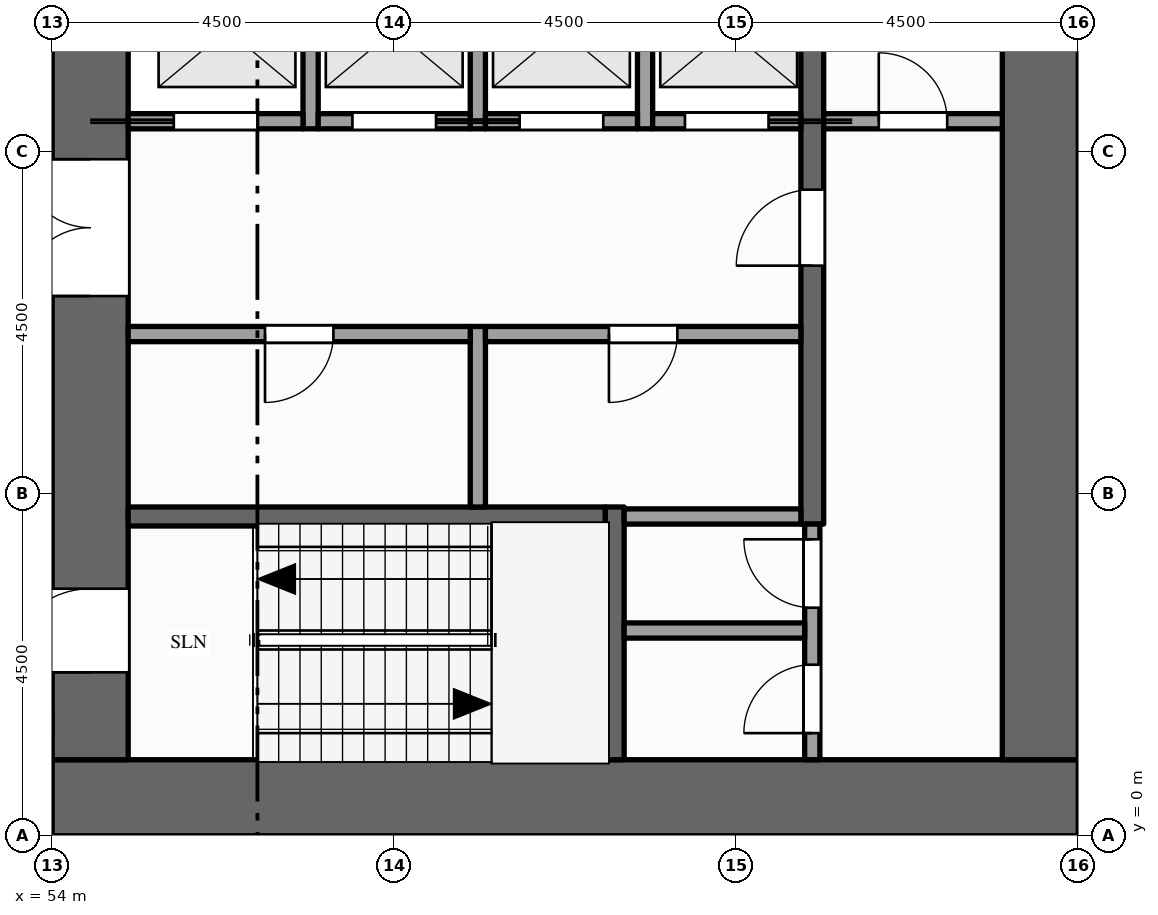
"""IFC4 building model, lengths in metres.
Left out: names, types, materials, properties, quantities, classifications, styles, units other than length and angle.
Written with IfcOpenShell. Run it as: python <this file> out.ifc"""

import sys

from ifc_helpers import new_model, si_unit, direction, frame, frame_2d, origin, place, context, subcontext, project, spatial, rectangle, extrude, element, fill, save


model = new_model("IFC4")
c1 = context("Model", 3, precision=1e-05, world=origin(), true_north=direction((0.0, 1.0)))
c2 = subcontext(c1, "Body", "Model", "MODEL_VIEW")
j1 = project(units=[si_unit("LENGTHUNIT", "METRE"), si_unit("PLANEANGLEUNIT", "RADIAN")], contexts=[c1])
p1 = place(None, origin())
s1 = spatial("IfcSite", under=j1, at=p1, CompositionType="ELEMENT")
p2 = place(p1, origin())
s2 = spatial("IfcBuilding", under=s1, at=p2, CompositionType="ELEMENT")
p3 = place(p2, frame((0.0, 0.0, 151.0)))
s3 = spatial("IfcBuildingStorey", under=s2, at=p3, CompositionType="ELEMENT", Elevation=151.0)
p4 = place(p3, frame((67.5, 0.5, -0.15), z_axis=(0.0, 0.0, 1.0), x_axis=(-1.0, 0.0, 0.0)))
e1 = element("IfcWall", 1, at=p4, inside=s3, PredefinedType="SHEAR", context=c2, shape_type="SweptSolid", body=[
    extrude(rectangle(XDim=13.5, YDim=1.0, at=frame_2d((6.75, 0.0))), origin(), (0.0, 0.0, 1.0), 4.0),
])
p5 = place(p3, frame((54.5, 1.0, -0.15), z_axis=(0.0, 0.0, 1.0), x_axis=(0.0, 1.0, 0.0)))
e2 = element("IfcWall", 2, at=p5, inside=s3, PredefinedType="SHEAR", context=c2, shape_type="SweptSolid", body=[
    extrude(rectangle(XDim=20.5, YDim=1.0, at=frame_2d((10.25, 0.0))), origin(), (0.0, 0.0, 1.0), 4.0),
])
p6 = place(p5, frame((6.1, 0.0, 0.15)))
e3 = element("IfcOpeningElement", 3, at=p6, cuts=e2, PredefinedType="OPENING", context=c2, shape_type="SweptSolid", body=[
    extrude(rectangle(XDim=1.8, YDim=2.1, at=frame_2d((0.9, 1.05))), frame((0.0, 0.51, 0.0), z_axis=(0.0, -1.0, 0.0), x_axis=(1.0, 0.0, 0.0)), (0.0, 0.0, 1.0), 1.02),
])
p7 = place(p5, frame((12.15, 0.0, 0.15)))
e4 = element("IfcOpeningElement", 4, at=p7, cuts=e2, PredefinedType="OPENING", context=c2, shape_type="SweptSolid", body=[
    extrude(rectangle(XDim=1.1, YDim=2.1, at=frame_2d((0.55, 1.05))), frame((0.0, 0.51, 0.0), z_axis=(0.0, -1.0, 0.0), x_axis=(1.0, 0.0, 0.0)), (0.0, 0.0, 1.0), 1.02),
])
p8 = place(p5, frame((1.15, 0.0, 0.15)))
e5 = element("IfcOpeningElement", 5, at=p8, cuts=e2, PredefinedType="OPENING", context=c2, shape_type="SweptSolid", body=[
    extrude(rectangle(XDim=1.1, YDim=2.1, at=frame_2d((0.55, 1.05))), frame((0.0, 0.51, 0.0), z_axis=(0.0, -1.0, 0.0), x_axis=(1.0, 0.0, 0.0)), (0.0, 0.0, 1.0), 1.02),
])
p9 = place(p5, frame((18.35, 0.0, 0.15)))
e6 = element("IfcOpeningElement", 6, at=p9, cuts=e2, PredefinedType="OPENING", context=c2, shape_type="SweptSolid", body=[
    extrude(rectangle(XDim=1.1, YDim=2.1, at=frame_2d((0.55, 1.05))), frame((0.0, 0.51, 0.0), z_axis=(0.0, -1.0, 0.0), x_axis=(1.0, 0.0, 0.0)), (0.0, 0.0, 1.0), 1.02),
])
p10 = place(p3, frame((67.0, 1.0, -0.15), z_axis=(0.0, 0.0, 1.0), x_axis=(0.0, 1.0, 0.0)))
e7 = element("IfcWall", 7, at=p10, inside=s3, PredefinedType="SHEAR", context=c2, shape_type="SweptSolid", body=[
    extrude(rectangle(XDim=20.5, YDim=1.0, at=frame_2d((10.25, 0.0))), origin(), (0.0, 0.0, 1.0), 4.0),
])
p11 = place(p3, frame((57.4, 9.3, 0.0), z_axis=(0.0, 0.0, 1.0), x_axis=(0.0, 1.0, 0.0)))
e8 = element("IfcWall", 8, at=p11, inside=s3, PredefinedType="SOLIDWALL", context=c2, shape_type="SweptSolid", body=[
    extrude(rectangle(XDim=2.6, YDim=0.2, at=frame_2d((1.3, 0.0))), origin(), (0.0, 0.0, 1.0), 3.85),
])
p12 = place(p3, frame((59.6, 4.325, 0.0), z_axis=(0.0, 0.0, 1.0), x_axis=(0.0, 1.0, 0.0)))
e9 = element("IfcWall", 9, at=p12, inside=s3, PredefinedType="PARTITIONING", context=c2, shape_type="SweptSolid", body=[
    extrude(rectangle(XDim=2.375, YDim=0.2, at=frame_2d((1.188, 0.0))), origin(), (0.0, 0.0, 1.0), 3.85),
])
p13 = place(p3, frame((59.6, 9.3, 0.0), z_axis=(0.0, 0.0, 1.0), x_axis=(0.0, 1.0, 0.0)))
e10 = element("IfcWall", 10, at=p13, inside=s3, PredefinedType="SOLIDWALL", context=c2, shape_type="SweptSolid", body=[
    extrude(rectangle(XDim=2.6, YDim=0.2, at=frame_2d((1.3, 0.0))), origin(), (0.0, 0.0, 1.0), 3.85),
])
p14 = place(p3, frame((61.4, 1.0, 0.0), z_axis=(0.0, 0.0, 1.0), x_axis=(0.0, 1.0, 0.0)))
e11 = element("IfcWall", 11, at=p14, inside=s3, PredefinedType="SHEAR", context=c2, shape_type="SweptSolid", body=[
    extrude(rectangle(XDim=3.325, YDim=0.25, at=frame_2d((1.663, 0.0))), origin(), (0.0, 0.0, 1.0), 3.85),
])
p15 = place(p3, frame((61.8, 9.3, 0.0), z_axis=(0.0, 0.0, 1.0), x_axis=(0.0, 1.0, 0.0)))
e12 = element("IfcWall", 12, at=p15, inside=s3, PredefinedType="SOLIDWALL", context=c2, shape_type="SweptSolid", body=[
    extrude(rectangle(XDim=2.6, YDim=0.2, at=frame_2d((1.3, 0.0))), origin(), (0.0, 0.0, 1.0), 3.85),
])
p16 = place(p3, frame((64.0, 1.0, 0.0), z_axis=(0.0, 0.0, 1.0), x_axis=(0.0, 1.0, 0.0)))
e13 = element("IfcWall", 13, at=p16, inside=s3, PredefinedType="PARTITIONING", context=c2, shape_type="SweptSolid", body=[
    extrude(rectangle(XDim=3.1, YDim=0.2, at=frame_2d((1.55, 0.0))), origin(), (0.0, 0.0, 1.0), 3.85),
])
p17 = place(p16, frame((0.35, 0.0, 0.0)))
e14 = element("IfcOpeningElement", 14, at=p17, cuts=e13, PredefinedType="OPENING", context=c2, shape_type="SweptSolid", body=[
    extrude(rectangle(XDim=0.9, YDim=2.1, at=frame_2d((0.45, 1.05))), frame((0.0, 0.11, 0.0), z_axis=(0.0, -1.0, 0.0), x_axis=(1.0, 0.0, 0.0)), (0.0, 0.0, 1.0), 0.22),
])
p18 = place(p16, frame((2.0, 0.0, 0.0)))
e15 = element("IfcOpeningElement", 15, at=p18, cuts=e13, PredefinedType="OPENING", context=c2, shape_type="SweptSolid", body=[
    extrude(rectangle(XDim=0.9, YDim=2.1, at=frame_2d((0.45, 1.05))), frame((0.0, 0.11, 0.0), z_axis=(0.0, -1.0, 0.0), x_axis=(1.0, 0.0, 0.0)), (0.0, 0.0, 1.0), 0.22),
])
p19 = place(p3, frame((64.0, 4.1, 0.0), z_axis=(0.0, 0.0, 1.0), x_axis=(0.0, 1.0, 0.0)))
e16 = element("IfcWall", 16, at=p19, inside=s3, PredefinedType="SHEAR", context=c2, shape_type="SweptSolid", body=[
    extrude(rectangle(XDim=14.5, YDim=0.3, at=frame_2d((7.25, 0.0))), origin(), (0.0, 0.0, 1.0), 3.85),
])
p20 = place(p19, frame((3.4, 0.0, 0.0)))
e17 = element("IfcOpeningElement", 17, at=p20, cuts=e16, PredefinedType="OPENING", context=c2, shape_type="SweptSolid", body=[
    extrude(rectangle(XDim=1.0, YDim=2.1, at=frame_2d((0.5, 1.05))), frame((0.0, 0.16, 0.0), z_axis=(0.0, -1.0, 0.0), x_axis=(1.0, 0.0, 0.0)), (0.0, 0.0, 1.0), 0.32),
])
p21 = place(p19, frame((9.1, 0.0, 0.0)))
e18 = element("IfcOpeningElement", 18, at=p21, cuts=e16, PredefinedType="OPENING", context=c2, shape_type="SweptSolid", body=[
    extrude(rectangle(XDim=1.0, YDim=2.1, at=frame_2d((0.5, 1.05))), frame((0.0, 0.16, 0.0), z_axis=(0.0, -1.0, 0.0), x_axis=(1.0, 0.0, 0.0)), (0.0, 0.0, 1.0), 0.32),
])
p22 = place(p3, frame((61.525, 2.7, 0.0), z_axis=(0.0, 0.0, 1.0), x_axis=(1.0, 0.0, 0.0)))
e19 = element("IfcWall", 19, at=p22, inside=s3, PredefinedType="PARTITIONING", context=c2, shape_type="SweptSolid", body=[
    extrude(rectangle(XDim=2.375, YDim=0.2, at=frame_2d((1.188, 0.0))), origin(), (0.0, 0.0, 1.0), 3.85),
])
p23 = place(p3, frame((55.0, 4.2, 0.0), z_axis=(0.0, 0.0, 1.0), x_axis=(1.0, 0.0, 0.0)))
e20 = element("IfcWall", 20, at=p23, inside=s3, PredefinedType="SHEAR", context=c2, shape_type="SweptSolid", body=[
    extrude(rectangle(XDim=6.275, YDim=0.25, at=frame_2d((3.137, 0.0))), origin(), (0.0, 0.0, 1.0), 3.85),
])
p24 = place(p3, frame((61.525, 4.2, 0.0), z_axis=(0.0, 0.0, 1.0), x_axis=(1.0, 0.0, 0.0)))
e21 = element("IfcWall", 21, at=p24, inside=s3, PredefinedType="PARTITIONING", context=c2, shape_type="SweptSolid", body=[
    extrude(rectangle(XDim=2.325, YDim=0.2, at=frame_2d((1.163, 0.0))), origin(), (0.0, 0.0, 1.0), 3.85),
])
p25 = place(p3, frame((55.0, 6.6, 0.0), z_axis=(0.0, 0.0, 1.0), x_axis=(1.0, 0.0, 0.0)))
e22 = element("IfcWall", 22, at=p25, inside=s3, PredefinedType="PARTITIONING", context=c2, shape_type="SweptSolid", body=[
    extrude(rectangle(XDim=4.5, YDim=0.2, at=frame_2d((2.25, 0.0))), origin(), (0.0, 0.0, 1.0), 3.85),
])
p26 = place(p25, frame((1.8, 0.0, 0.0)))
e23 = element("IfcOpeningElement", 23, at=p26, cuts=e22, PredefinedType="OPENING", context=c2, shape_type="SweptSolid", body=[
    extrude(rectangle(XDim=0.9, YDim=2.1, at=frame_2d((0.45, 1.05))), frame((0.0, 0.11, 0.0), z_axis=(0.0, -1.0, 0.0), x_axis=(1.0, 0.0, 0.0)), (0.0, 0.0, 1.0), 0.22),
])
p27 = place(p3, frame((59.7, 6.6, 0.0), z_axis=(0.0, 0.0, 1.0), x_axis=(1.0, 0.0, 0.0)))
e24 = element("IfcWall", 24, at=p27, inside=s3, PredefinedType="PARTITIONING", context=c2, shape_type="SweptSolid", body=[
    extrude(rectangle(XDim=4.15, YDim=0.2, at=frame_2d((2.075, 0.0))), origin(), (0.0, 0.0, 1.0), 3.85),
])
p28 = place(p27, frame((1.625, 0.0, 0.0)))
e25 = element("IfcOpeningElement", 25, at=p28, cuts=e24, PredefinedType="OPENING", context=c2, shape_type="SweptSolid", body=[
    extrude(rectangle(XDim=0.9, YDim=2.1, at=frame_2d((0.45, 1.05))), frame((0.0, 0.11, 0.0), z_axis=(0.0, -1.0, 0.0), x_axis=(1.0, 0.0, 0.0)), (0.0, 0.0, 1.0), 0.22),
])
p29 = place(p3, frame((55.0, 9.4, 0.0), z_axis=(0.0, 0.0, 1.0), x_axis=(1.0, 0.0, 0.0)))
e26 = element("IfcWall", 26, at=p29, inside=s3, PredefinedType="SOLIDWALL", context=c2, shape_type="SweptSolid", body=[
    extrude(rectangle(XDim=2.3, YDim=0.2, at=frame_2d((1.15, 0.0))), origin(), (0.0, 0.0, 1.0), 3.85),
])
p30 = place(p29, frame((0.6, 0.0, 0.012)))
e27 = element("IfcOpeningElement", 27, at=p30, cuts=e26, PredefinedType="OPENING", context=c2, shape_type="SweptSolid", body=[
    extrude(rectangle(XDim=1.1, YDim=2.1, at=frame_2d((0.55, 1.05))), frame((0.0, 0.11, 0.0), z_axis=(0.0, -1.0, 0.0), x_axis=(1.0, 0.0, 0.0)), (0.0, 0.0, 1.0), 0.22),
])
p31 = place(p3, frame((57.5, 9.4, 0.0), z_axis=(0.0, 0.0, 1.0), x_axis=(1.0, 0.0, 0.0)))
e28 = element("IfcWall", 28, at=p31, inside=s3, PredefinedType="SOLIDWALL", context=c2, shape_type="SweptSolid", body=[
    extrude(rectangle(XDim=2.0, YDim=0.2, at=frame_2d((1.0, 0.0))), origin(), (0.0, 0.0, 1.0), 3.85),
])
p32 = place(p31, frame((0.45, 0.0, 0.012)))
e29 = element("IfcOpeningElement", 29, at=p32, cuts=e28, PredefinedType="OPENING", context=c2, shape_type="SweptSolid", body=[
    extrude(rectangle(XDim=1.1, YDim=2.1, at=frame_2d((0.55, 1.05))), frame((0.0, 0.11, 0.0), z_axis=(0.0, -1.0, 0.0), x_axis=(1.0, 0.0, 0.0)), (0.0, 0.0, 1.0), 0.22),
])
p33 = place(p3, frame((59.7, 9.4, 0.0), z_axis=(0.0, 0.0, 1.0), x_axis=(1.0, 0.0, 0.0)))
e30 = element("IfcWall", 30, at=p33, inside=s3, PredefinedType="SOLIDWALL", context=c2, shape_type="SweptSolid", body=[
    extrude(rectangle(XDim=2.0, YDim=0.2, at=frame_2d((1.0, 0.0))), origin(), (0.0, 0.0, 1.0), 3.85),
])
p34 = place(p33, frame((0.45, 0.0, 0.012)))
e31 = element("IfcOpeningElement", 31, at=p34, cuts=e30, PredefinedType="OPENING", context=c2, shape_type="SweptSolid", body=[
    extrude(rectangle(XDim=1.1, YDim=2.1, at=frame_2d((0.55, 1.05))), frame((0.0, 0.11, 0.0), z_axis=(0.0, -1.0, 0.0), x_axis=(1.0, 0.0, 0.0)), (0.0, 0.0, 1.0), 0.22),
])
p35 = place(p3, frame((61.9, 9.4, 0.0), z_axis=(0.0, 0.0, 1.0), x_axis=(1.0, 0.0, 0.0)))
e32 = element("IfcWall", 32, at=p35, inside=s3, PredefinedType="SOLIDWALL", context=c2, shape_type="SweptSolid", body=[
    extrude(rectangle(XDim=1.95, YDim=0.2, at=frame_2d((0.975, 0.0))), origin(), (0.0, 0.0, 1.0), 3.85),
])
p36 = place(p35, frame((0.425, 0.0, 0.012)))
e33 = element("IfcOpeningElement", 33, at=p36, cuts=e32, PredefinedType="OPENING", context=c2, shape_type="SweptSolid", body=[
    extrude(rectangle(XDim=1.1, YDim=2.1, at=frame_2d((0.55, 1.05))), frame((0.0, 0.11, 0.0), z_axis=(0.0, -1.0, 0.0), x_axis=(1.0, 0.0, 0.0)), (0.0, 0.0, 1.0), 0.22),
])
p37 = place(p3, frame((64.15, 9.4, 0.0), z_axis=(0.0, 0.0, 1.0), x_axis=(1.0, 0.0, 0.0)))
e34 = element("IfcWall", 34, at=p37, inside=s3, PredefinedType="PARTITIONING", context=c2, shape_type="SweptSolid", body=[
    extrude(rectangle(XDim=2.35, YDim=0.2, at=frame_2d((1.175, 0.0))), origin(), (0.0, 0.0, 1.0), 3.85),
])
p38 = place(p37, frame((0.725, 0.0, 0.0)))
e35 = element("IfcOpeningElement", 35, at=p38, cuts=e34, PredefinedType="OPENING", context=c2, shape_type="SweptSolid", body=[
    extrude(rectangle(XDim=0.9, YDim=2.1, at=frame_2d((0.45, 1.05))), frame((0.0, 0.11, 0.0), z_axis=(0.0, -1.0, 0.0), x_axis=(1.0, 0.0, 0.0)), (0.0, 0.0, 1.0), 0.22),
])
p39 = place(p30, origin())
e36 = element("IfcDoor", 36, at=p39, inside=s3, OperationType="SLIDING_TO_LEFT", PredefinedType="DOOR", context=c2, shape_type="SweptSolid", body=[
    extrude(rectangle(XDim=1.1, YDim=2.1, at=frame_2d((0.55, 1.05))), frame((0.0, 0.025, 0.0), z_axis=(0.0, -1.0, 0.0), x_axis=(1.0, 0.0, 0.0)), (0.0, 0.0, 1.0), 0.05),
])
fill(e27, e36)
p40 = place(p32, origin())
e37 = element("IfcDoor", 37, at=p40, inside=s3, OperationType="SLIDING_TO_RIGHT", PredefinedType="DOOR", context=c2, shape_type="SweptSolid", body=[
    extrude(rectangle(XDim=1.1, YDim=2.1, at=frame_2d((0.55, 1.05))), frame((0.0, 0.025, 0.0), z_axis=(0.0, -1.0, 0.0), x_axis=(1.0, 0.0, 0.0)), (0.0, 0.0, 1.0), 0.05),
])
fill(e29, e37)
p41 = place(p34, origin())
e38 = element("IfcDoor", 38, at=p41, inside=s3, OperationType="SLIDING_TO_LEFT", PredefinedType="DOOR", context=c2, shape_type="SweptSolid", body=[
    extrude(rectangle(XDim=1.1, YDim=2.1, at=frame_2d((0.55, 1.05))), frame((0.0, 0.025, 0.0), z_axis=(0.0, -1.0, 0.0), x_axis=(1.0, 0.0, 0.0)), (0.0, 0.0, 1.0), 0.05),
])
fill(e31, e38)
p42 = place(p36, origin())
e39 = element("IfcDoor", 39, at=p42, inside=s3, OperationType="SLIDING_TO_RIGHT", PredefinedType="DOOR", context=c2, shape_type="SweptSolid", body=[
    extrude(rectangle(XDim=1.1, YDim=2.1, at=frame_2d((0.55, 1.05))), frame((0.0, 0.025, 0.0), z_axis=(0.0, -1.0, 0.0), x_axis=(1.0, 0.0, 0.0)), (0.0, 0.0, 1.0), 0.05),
])
fill(e33, e39)
p43 = place(p6, origin())
e40 = element("IfcDoor", 40, at=p43, inside=s3, OperationType="DOUBLE_DOOR_SINGLE_SWING", PredefinedType="DOOR", context=c2, shape_type="SweptSolid", body=[
    extrude(rectangle(XDim=1.8, YDim=2.1, at=frame_2d((0.9, 1.05))), frame((0.0, 0.025, 0.0), z_axis=(0.0, -1.0, 0.0), x_axis=(1.0, 0.0, 0.0)), (0.0, 0.0, 1.0), 0.05),
])
fill(e3, e40)
p44 = place(p20, origin())
e41 = element("IfcDoor", 41, at=p44, inside=s3, OperationType="SINGLE_SWING_LEFT", PredefinedType="DOOR", context=c2, shape_type="SweptSolid", body=[
    extrude(rectangle(XDim=1.0, YDim=2.1, at=frame_2d((0.5, 1.05))), frame((0.0, 0.025, 0.0), z_axis=(0.0, -1.0, 0.0), x_axis=(1.0, 0.0, 0.0)), (0.0, 0.0, 1.0), 0.05),
])
fill(e17, e41)
p45 = place(p38, origin())
e42 = element("IfcDoor", 42, at=p45, inside=s3, OperationType="SINGLE_SWING_LEFT", PredefinedType="DOOR", context=c2, shape_type="SweptSolid", body=[
    extrude(rectangle(XDim=0.9, YDim=2.1, at=frame_2d((0.45, 1.05))), frame((0.0, 0.025, 0.0), z_axis=(0.0, -1.0, 0.0), x_axis=(1.0, 0.0, 0.0)), (0.0, 0.0, 1.0), 0.05),
])
fill(e35, e42)
p46 = place(p8, origin())
e43 = element("IfcDoor", 43, at=p46, inside=s3, OperationType="SINGLE_SWING_LEFT", PredefinedType="DOOR", context=c2, shape_type="SweptSolid", body=[
    extrude(rectangle(XDim=1.1, YDim=2.1, at=frame_2d((0.55, 1.05))), frame((0.0, 0.025, 0.0), z_axis=(0.0, -1.0, 0.0), x_axis=(1.0, 0.0, 0.0)), (0.0, 0.0, 1.0), 0.05),
])
fill(e5, e43)
p47 = place(p17, origin())
e44 = element("IfcDoor", 44, at=p47, inside=s3, OperationType="SINGLE_SWING_LEFT", PredefinedType="DOOR", context=c2, shape_type="SweptSolid", body=[
    extrude(rectangle(XDim=0.9, YDim=2.1, at=frame_2d((0.45, 1.05))), frame((0.0, 0.025, 0.0), z_axis=(0.0, -1.0, 0.0), x_axis=(1.0, 0.0, 0.0)), (0.0, 0.0, 1.0), 0.05),
])
fill(e14, e44)
p48 = place(p18, origin())
e45 = element("IfcDoor", 45, at=p48, inside=s3, OperationType="SINGLE_SWING_RIGHT", PredefinedType="DOOR", context=c2, shape_type="SweptSolid", body=[
    extrude(rectangle(XDim=0.9, YDim=2.1, at=frame_2d((0.45, 1.05))), frame((0.0, 0.025, 0.0), z_axis=(0.0, -1.0, 0.0), x_axis=(1.0, 0.0, 0.0)), (0.0, 0.0, 1.0), 0.05),
])
fill(e15, e45)
p49 = place(p26, origin())
e46 = element("IfcDoor", 46, at=p49, inside=s3, OperationType="SINGLE_SWING_LEFT", PredefinedType="DOOR", context=c2, shape_type="SweptSolid", body=[
    extrude(rectangle(XDim=0.9, YDim=2.1, at=frame_2d((0.45, 1.05))), frame((0.0, 0.025, 0.0), z_axis=(0.0, -1.0, 0.0), x_axis=(1.0, 0.0, 0.0)), (0.0, 0.0, 1.0), 0.05),
])
fill(e23, e46)
p50 = place(p28, origin())
e47 = element("IfcDoor", 47, at=p50, inside=s3, OperationType="SINGLE_SWING_LEFT", PredefinedType="DOOR", context=c2, shape_type="SweptSolid", body=[
    extrude(rectangle(XDim=0.9, YDim=2.1, at=frame_2d((0.45, 1.05))), frame((0.0, 0.025, 0.0), z_axis=(0.0, -1.0, 0.0), x_axis=(1.0, 0.0, 0.0)), (0.0, 0.0, 1.0), 0.05),
])
fill(e25, e47)
save(model, sys.argv[1])
